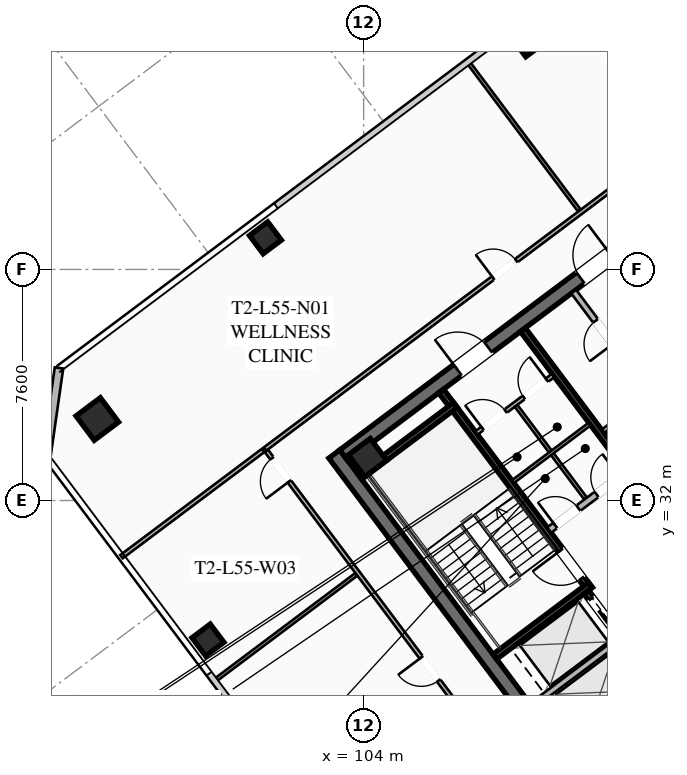
"""IFC4 building model, lengths in metres.
Left out: names, types, materials, properties, quantities, classifications, styles, units other than length and angle.
Written with IfcOpenShell. Run it as: python <this file> out.ifc"""

import sys

from ifc_helpers import new_model, si_unit, direction, frame, frame_2d, origin, origin_2d, place, context, subcontext, project, spatial, rectangle, hollow_rectangle, extrude, element, fill, save


model = new_model("IFC4")
c1 = context("Model", 3, precision=1e-05, world=origin(), true_north=direction((0.0, 1.0)))
c2 = subcontext(c1, "Body", "Model", "MODEL_VIEW")
j1 = project(units=[si_unit("LENGTHUNIT", "METRE"), si_unit("PLANEANGLEUNIT", "RADIAN")], contexts=[c1])
p1 = place(None, origin())
s1 = spatial("IfcSite", under=j1, at=p1, CompositionType="ELEMENT")
p2 = place(p1, origin())
s2 = spatial("IfcBuilding", under=s1, at=p2, CompositionType="ELEMENT")
p3 = place(p2, frame((0.0, 0.0, 204.2)))
s3 = spatial("IfcBuildingStorey", under=s2, at=p3, CompositionType="ELEMENT", Elevation=204.2)
p4 = place(p3, frame((112.396, 21.047, 0.0), z_axis=(0.0, 0.0, 1.0), x_axis=(-0.600005007985, 0.799996243986, 0.0)))
e1 = element("IfcWall", 1, at=p4, inside=s3, PredefinedType="SHEAR", context=c2, shape_type="SweptSolid", body=[
    extrude(rectangle(XDim=15.6, YDim=0.45, at=frame_2d((7.8, 0.0))), origin(), (0.0, 0.0, 1.0), 3.55),
])
p5 = place(p3, frame((103.351, 33.482, 0.0), z_axis=(0.0, 0.0, 1.0), x_axis=(0.8, 0.6, 0.0)))
e2 = element("IfcWall", 2, at=p5, inside=s3, PredefinedType="SHEAR", context=c2, shape_type="SweptSolid", body=[
    extrude(rectangle(XDim=15.26, YDim=0.45, at=frame_2d((7.63, 0.0))), origin(), (0.0, 0.0, 1.0), 3.55),
])
p6 = place(p5, frame((4.68, 0.0, 0.0)))
e3 = element("IfcOpeningElement", 3, at=p6, cuts=e2, PredefinedType="OPENING", context=c2, shape_type="SweptSolid", body=[
    extrude(rectangle(XDim=1.25, YDim=2.25, at=frame_2d((0.625, 1.125))), frame((0.0, 0.235, 0.0), z_axis=(0.0, -1.0, 0.0), x_axis=(1.0, 0.0, 0.0)), (0.0, 0.0, 1.0), 0.47),
])
p7 = place(p5, frame((9.73, 0.0, 0.0)))
e4 = element("IfcOpeningElement", 4, at=p7, cuts=e2, PredefinedType="OPENING", context=c2, shape_type="SweptSolid", body=[
    extrude(rectangle(XDim=1.25, YDim=2.25, at=frame_2d((0.625, 1.125))), frame((0.0, 0.235, 0.0), z_axis=(0.0, -1.0, 0.0), x_axis=(1.0, 0.0, 0.0)), (0.0, 0.0, 1.0), 0.47),
])
p8 = place(p3, frame((104.13, 33.41, 0.0), z_axis=(0.0, 0.0, 1.0), x_axis=(0.799999996291, 0.600000004945, 0.0)))
e5 = element("IfcColumn", 5, at=p8, inside=s3, PredefinedType="COLUMN", context=c2, shape_type="SweptSolid", body=[
    extrude(hollow_rectangle(XDim=0.9, YDim=0.9, WallThickness=0.04, at=origin_2d()), origin(), (0.0, 0.0, 1.0), 3.37),
])
p9 = place(p3, frame((95.24, 34.68, 0.0), z_axis=(0.0, 0.0, 1.0), x_axis=(0.799999996291, 0.600000004945, 0.0)))
e6 = element("IfcColumn", 6, at=p9, inside=s3, PredefinedType="COLUMN", context=c2, shape_type="SweptSolid", body=[
    extrude(hollow_rectangle(XDim=1.0, YDim=1.0, WallThickness=0.04, at=origin_2d()), origin(), (0.0, 0.0, 1.0), 3.37),
])
for number, where, z_axis, x_axis in (
    (7, (109.41, 47.12, 0.0), (0.0, 0.0, 1.0), (0.8, 0.6, 0.0)),
    (8, (100.77, 40.64, 0.0), (0.0, 0.0, 1.0), (0.8, 0.6, 0.0)),
    (9, (98.88, 27.41, 0.0), (0.0, 0.0, 1.0), (0.8, 0.6, 0.0)),
):
    element("IfcColumn", number, at=place(p3, frame(where, z_axis=z_axis, x_axis=x_axis)), inside=s3, PredefinedType="COLUMN", context=c2, shape_type="SweptSolid", body=[
        extrude(hollow_rectangle(XDim=0.75, YDim=0.75, WallThickness=0.032, at=origin_2d()), origin(), (0.0, 0.0, 1.0), 3.37),
    ])
p10 = place(p3, frame((93.56, 33.42, 0.0), z_axis=(0.0, 0.0, 1.0), x_axis=(0.14138683146, 0.989954425158, 0.0)))
e10 = element("IfcWall", 10, at=p10, inside=s3, PredefinedType="SOLIDWALL", context=c2, shape_type="SweptSolid", body=[
    extrude(rectangle(XDim=2.97, YDim=0.28, at=frame_2d((1.485, 0.0))), origin(), (0.0, 0.0, 1.0), 3.37),
])
p11 = place(p3, frame((111.44, 29.08, 0.0), z_axis=(0.0, 0.0, 1.0), x_axis=(-0.59999041401, 0.800007189403, 0.0)))
e11 = element("IfcWall", 11, at=p11, inside=s3, PredefinedType="SHEAR", context=c2, shape_type="SweptSolid", body=[
    extrude(rectangle(XDim=8.15, YDim=0.2, at=frame_2d((4.075, 0.0))), origin(), (0.0, 0.0, 1.0), 3.37),
])
p12 = place(p11, frame((0.45, 0.0, 0.0)))
e12 = element("IfcOpeningElement", 12, at=p12, cuts=e11, PredefinedType="OPENING", context=c2, shape_type="SweptSolid", body=[
    extrude(rectangle(XDim=1.15, YDim=2.2, at=frame_2d((0.575, 1.1))), frame((0.0, 0.11, 0.0), z_axis=(0.0, -1.0, 0.0), x_axis=(1.0, 0.0, 0.0)), (0.0, 0.0, 1.0), 0.22),
])
for number, where, z_axis, x_axis in (
    (13, (108.316, 26.862, 0.0), (0.0, 0.0, 1.0), (0.8, 0.6, 0.0)),
    (14, (103.876, 32.782, 0.0), (0.0, 0.0, 1.0), (0.8, 0.6, 0.0)),
):
    element("IfcWall", number, at=place(p3, frame(where, z_axis=z_axis, x_axis=x_axis)), inside=s3, PredefinedType="SHEAR", context=c2, shape_type="SweptSolid", body=[
        extrude(rectangle(XDim=3.93, YDim=0.2, at=frame_2d((1.965, 0.0))), origin(), (0.0, 0.0, 1.0), 3.37),
    ])
p13 = place(p3, frame((118.058, 25.856, 0.0), z_axis=(0.0, 0.0, 1.0), x_axis=(-0.600002657301, 0.799998007018, 0.0)))
e15 = element("IfcWall", 15, at=p13, inside=s3, PredefinedType="SHEAR", context=c2, shape_type="SweptSolid", body=[
    extrude(rectangle(XDim=14.7, YDim=0.2, at=frame_2d((7.35, 0.0))), origin(), (0.0, 0.0, 1.0), 3.37),
])
p14 = place(p3, frame((110.104, 31.028, 0.0), z_axis=(0.0, 0.0, 1.0), x_axis=(0.800018601094, 0.59997519774, 0.0)))
e16 = element("IfcWall", 16, at=p14, inside=s3, PredefinedType="SOLIDWALL", context=c2, shape_type="SweptSolid", body=[
    extrude(rectangle(XDim=3.15, YDim=0.22, at=frame_2d((1.575, 0.0))), origin(), (0.0, 0.0, 1.0), 2.723),
])
p15 = place(p14, frame((0.25, 0.0, 0.0)))
e17 = element("IfcOpeningElement", 17, at=p15, cuts=e16, PredefinedType="OPENING", context=c2, shape_type="SweptSolid", body=[
    extrude(rectangle(XDim=0.95, YDim=2.05, at=frame_2d((0.475, 1.025))), frame((0.0, 0.12, 0.0), z_axis=(0.0, -1.0, 0.0), x_axis=(1.0, 0.0, 0.0)), (0.0, 0.0, 1.0), 0.24),
])
p16 = place(p14, frame((1.95, 0.0, 0.0)))
e18 = element("IfcOpeningElement", 18, at=p16, cuts=e16, PredefinedType="OPENING", context=c2, shape_type="SweptSolid", body=[
    extrude(rectangle(XDim=0.95, YDim=2.05, at=frame_2d((0.475, 1.025))), frame((0.0, 0.12, 0.0), z_axis=(0.0, -1.0, 0.0), x_axis=(1.0, 0.0, 0.0)), (0.0, 0.0, 1.0), 0.24),
])
p17 = place(p3, frame((115.25, 23.75, 0.0), z_axis=(0.0, 0.0, 1.0), x_axis=(-0.599994036198, 0.800004472816, 0.0)))
e19 = element("IfcWall", 19, at=p17, inside=s3, PredefinedType="SHEAR", context=c2, shape_type="SweptSolid", body=[
    extrude(rectangle(XDim=6.55, YDim=0.2, at=frame_2d((3.275, 0.0))), origin(), (0.0, 0.0, 1.0), 3.37),
])
p18 = place(p17, frame((4.975, 0.0, 0.0)))
e20 = element("IfcOpeningElement", 20, at=p18, cuts=e19, PredefinedType="OPENING", context=c2, shape_type="SweptSolid", body=[
    extrude(rectangle(XDim=1.3, YDim=2.25, at=frame_2d((0.65, 1.125))), frame((0.0, 0.11, 0.0), z_axis=(0.0, -1.0, 0.0), x_axis=(1.0, 0.0, 0.0)), (0.0, 0.0, 1.0), 0.22),
])
p19 = place(p17, frame((2.975, 0.0, 0.0)))
e21 = element("IfcOpeningElement", 21, at=p19, cuts=e19, PredefinedType="OPENING", context=c2, shape_type="SweptSolid", body=[
    extrude(rectangle(XDim=1.3, YDim=2.25, at=frame_2d((0.65, 1.125))), frame((0.0, 0.11, 0.0), z_axis=(0.0, -1.0, 0.0), x_axis=(1.0, 0.0, 0.0)), (0.0, 0.0, 1.0), 0.22),
])
p20 = place(p17, frame((0.775, 0.0, 0.0)))
e22 = element("IfcOpeningElement", 22, at=p20, cuts=e19, PredefinedType="OPENING", context=c2, shape_type="SweptSolid", body=[
    extrude(rectangle(XDim=1.3, YDim=2.25, at=frame_2d((0.65, 1.125))), frame((0.0, 0.11, 0.0), z_axis=(0.0, -1.0, 0.0), x_axis=(1.0, 0.0, 0.0)), (0.0, 0.0, 1.0), 0.22),
])
for number, where, z_axis, x_axis in (
    (23, (110.746, 23.622, 0.0), (0.0, 0.0, 1.0), (0.8, 0.6, 0.0)),
    (24, (109.528, 25.246, 0.0), (0.0, 0.0, 1.0), (0.8, 0.6, 0.0)),
):
    element("IfcWall", number, at=place(p3, frame(where, z_axis=z_axis, x_axis=x_axis)), inside=s3, PredefinedType="SOLIDWALL", context=c2, shape_type="SweptSolid", body=[
        extrude(rectangle(XDim=3.58, YDim=0.2, at=frame_2d((1.79, 0.0))), origin(), (0.0, 0.0, 1.0), 3.37),
    ])
p21 = place(p3, frame((107.71, 34.22, 0.0), z_axis=(0.0, 0.0, 1.0), x_axis=(0.799981399002, 0.60002480053, 0.0)))
e25 = element("IfcWall", 25, at=p21, inside=s3, PredefinedType="PARTITIONING", context=c2, shape_type="SweptSolid", body=[
    extrude(rectangle(XDim=3.15, YDim=0.135, at=frame_2d((1.575, 0.0))), origin(), (0.0, 0.0, 1.0), 2.723),
])
p22 = place(p21, frame((0.25, 0.0, 0.0)))
e26 = element("IfcOpeningElement", 26, at=p22, cuts=e25, PredefinedType="OPENING", context=c2, shape_type="SweptSolid", body=[
    extrude(rectangle(XDim=0.95, YDim=2.05, at=frame_2d((0.475, 1.025))), frame((0.0, 0.077, 0.0), z_axis=(0.0, -1.0, 0.0), x_axis=(1.0, 0.0, 0.0)), (0.0, 0.0, 1.0), 0.155),
])
p23 = place(p21, frame((1.95, 0.0, 0.0)))
e27 = element("IfcOpeningElement", 27, at=p23, cuts=e25, PredefinedType="OPENING", context=c2, shape_type="SweptSolid", body=[
    extrude(rectangle(XDim=0.95, YDim=2.05, at=frame_2d((0.475, 1.025))), frame((0.0, 0.077, 0.0), z_axis=(0.0, -1.0, 0.0), x_axis=(1.0, 0.0, 0.0)), (0.0, 0.0, 1.0), 0.155),
])
p24 = place(p3, frame((111.296, 32.072, 0.0), z_axis=(0.0, 0.0, 1.0), x_axis=(-0.59995887973, 0.800030838552, 0.0)))
e28 = element("IfcWall", 28, at=p24, inside=s3, PredefinedType="PARTITIONING", context=c2, shape_type="SweptSolid", body=[
    extrude(rectangle(XDim=3.8, YDim=0.11, at=frame_2d((1.9, 0.0))), origin(), (0.0, 0.0, 1.0), 2.723),
])
p25 = place(p3, frame((108.91, 32.62, 0.0), z_axis=(0.0, 0.0, 1.0), x_axis=(0.800018601094, 0.59997519774, 0.0)))
e29 = element("IfcWall", 29, at=p25, inside=s3, PredefinedType="PARTITIONING", context=c2, shape_type="SweptSolid", body=[
    extrude(rectangle(XDim=3.15, YDim=0.11, at=frame_2d((1.575, 0.0))), origin(), (0.0, 0.0, 1.0), 2.723),
])
p26 = place(p3, frame((115.11, 33.27, 0.0), z_axis=(0.0, 0.0, 1.0), x_axis=(-0.600011160345, 0.79999162962, 0.0)))
e30 = element("IfcWall", 30, at=p26, inside=s3, PredefinedType="SOLIDWALL", context=c2, shape_type="SweptSolid", body=[
    extrude(rectangle(XDim=7.0, YDim=0.2, at=frame_2d((3.5, 0.0))), origin(), (0.0, 0.0, 1.0), 2.723),
])
p27 = place(p26, frame((0.85, 0.0, 0.0)))
e31 = element("IfcOpeningElement", 31, at=p27, cuts=e30, PredefinedType="OPENING", context=c2, shape_type="SweptSolid", body=[
    extrude(rectangle(XDim=0.95, YDim=2.05, at=frame_2d((0.475, 1.025))), frame((0.0, 0.11, 0.0), z_axis=(0.0, -1.0, 0.0), x_axis=(1.0, 0.0, 0.0)), (0.0, 0.0, 1.0), 0.22),
])
p28 = place(p26, frame((4.85, 0.0, 0.0)))
e32 = element("IfcOpeningElement", 32, at=p28, cuts=e30, PredefinedType="OPENING", context=c2, shape_type="SweptSolid", body=[
    extrude(rectangle(XDim=0.95, YDim=2.05, at=frame_2d((0.475, 1.025))), frame((0.0, 0.11, 0.0), z_axis=(0.0, -1.0, 0.0), x_axis=(1.0, 0.0, 0.0)), (0.0, 0.0, 1.0), 0.22),
])
p29 = place(p3, frame((111.876, 34.282, 0.0), z_axis=(0.0, 0.0, 1.0), x_axis=(0.8, 0.6, 0.0)))
e33 = element("IfcWall", 33, at=p29, inside=s3, PredefinedType="PARTITIONING", context=c2, shape_type="SweptSolid", body=[
    extrude(rectangle(XDim=1.88, YDim=0.135, at=frame_2d((0.94, 0.0))), origin(), (0.0, 0.0, 1.0), 2.723),
])
p30 = place(p3, frame((100.756, 33.692, 0.0), z_axis=(0.0, 0.0, 1.0), x_axis=(0.799998716732, 0.60000171102, 0.0)))
e34 = element("IfcWall", 34, at=p30, inside=s3, PredefinedType="PARTITIONING", context=c2, shape_type="SweptSolid", body=[
    extrude(rectangle(XDim=22.83, YDim=0.135, at=frame_2d((11.415, 0.0))), origin(), (0.0, 0.0, 1.0), 2.723),
])
p31 = place(p30, frame((9.38, 0.0, 0.0)))
e35 = element("IfcOpeningElement", 35, at=p31, cuts=e34, PredefinedType="OPENING", context=c2, shape_type="SweptSolid", body=[
    extrude(rectangle(XDim=0.95, YDim=2.05, at=frame_2d((0.475, 1.025))), frame((0.0, 0.077, 0.0), z_axis=(0.0, -1.0, 0.0), x_axis=(1.0, 0.0, 0.0)), (0.0, 0.0, 1.0), 0.155),
])
p32 = place(p30, frame((21.58, 0.0, 0.0)))
e36 = element("IfcOpeningElement", 36, at=p32, cuts=e34, PredefinedType="OPENING", context=c2, shape_type="SweptSolid", body=[
    extrude(rectangle(XDim=0.95, YDim=2.05, at=frame_2d((0.475, 1.025))), frame((0.0, 0.077, 0.0), z_axis=(0.0, -1.0, 0.0), x_axis=(1.0, 0.0, 0.0)), (0.0, 0.0, 1.0), 0.155),
])
p33 = place(p3, frame((111.092, 41.544, 0.0), z_axis=(0.0, 0.0, 1.0), x_axis=(-0.600006403464, 0.799995197362, 0.0)))
e37 = element("IfcWall", 37, at=p33, inside=s3, PredefinedType="PARTITIONING", context=c2, shape_type="SweptSolid", body=[
    extrude(rectangle(XDim=6.1, YDim=0.11, at=frame_2d((3.05, 0.0))), origin(), (0.0, 0.0, 1.0), 2.723),
])
p34 = place(p3, frame((113.23, 17.06, 0.0), z_axis=(0.0, 0.0, 1.0), x_axis=(-0.600003772342, 0.79999717073, 0.0)))
e38 = element("IfcWall", 38, at=p34, inside=s3, PredefinedType="PARTITIONING", context=c2, shape_type="SweptSolid", body=[
    extrude(rectangle(XDim=20.71, YDim=0.135, at=frame_2d((10.355, 0.0))), origin(), (0.0, 0.0, 1.0), 2.723),
])
p35 = place(p34, frame((0.3, 0.0, 0.0)))
e39 = element("IfcOpeningElement", 39, at=p35, cuts=e38, PredefinedType="OPENING", context=c2, shape_type="SweptSolid", body=[
    extrude(rectangle(XDim=0.95, YDim=2.05, at=frame_2d((0.475, 1.025))), frame((0.0, 0.077, 0.0), z_axis=(0.0, -1.0, 0.0), x_axis=(1.0, 0.0, 0.0)), (0.0, 0.0, 1.0), 0.155),
])
p36 = place(p34, frame((11.272, 0.0, 0.0)))
e40 = element("IfcOpeningElement", 40, at=p36, cuts=e38, PredefinedType="OPENING", context=c2, shape_type="SweptSolid", body=[
    extrude(rectangle(XDim=0.95, YDim=2.05, at=frame_2d((0.475, 1.025))), frame((0.0, 0.077, 0.0), z_axis=(0.0, -1.0, 0.0), x_axis=(1.0, 0.0, 0.0)), (0.0, 0.0, 1.0), 0.155),
])
p37 = place(p34, frame((19.46, 0.0, 0.0)))
e41 = element("IfcOpeningElement", 41, at=p37, cuts=e38, PredefinedType="OPENING", context=c2, shape_type="SweptSolid", body=[
    extrude(rectangle(XDim=0.95, YDim=2.05, at=frame_2d((0.475, 1.025))), frame((0.0, 0.077, 0.0), z_axis=(0.0, -1.0, 0.0), x_axis=(1.0, 0.0, 0.0)), (0.0, 0.0, 1.0), 0.155),
])
p38 = place(p3, frame((100.692, 33.644, 0.0), z_axis=(0.0, 0.0, 1.0), x_axis=(-0.800005033825, -0.599993288175, 0.0)))
e42 = element("IfcWall", 42, at=p38, inside=s3, PredefinedType="PARTITIONING", context=c2, shape_type="SweptSolid", body=[
    extrude(rectangle(XDim=5.82, YDim=0.135, at=frame_2d((2.91, 0.0))), origin(), (0.0, 0.0, 1.0), 2.723),
])
p39 = place(p3, frame((99.096, 26.072, 0.0), z_axis=(0.0, 0.0, 1.0), x_axis=(0.800005033825, 0.599993288175, 0.0)))
e43 = element("IfcWall", 43, at=p39, inside=s3, PredefinedType="PARTITIONING", context=c2, shape_type="SweptSolid", body=[
    extrude(rectangle(XDim=5.82, YDim=0.11, at=frame_2d((2.91, 0.0))), origin(), (0.0, 0.0, 1.0), 2.723),
])
p40 = place(p6, origin())
e44 = element("IfcDoor", 44, at=p40, inside=s3, OperationType="SINGLE_SWING_LEFT", PredefinedType="DOOR", context=c2, shape_type="SweptSolid", body=[
    extrude(rectangle(XDim=1.25, YDim=2.25, at=frame_2d((0.625, 1.125))), frame((0.0, 0.025, 0.0), z_axis=(0.0, -1.0, 0.0), x_axis=(1.0, 0.0, 0.0)), (0.0, 0.0, 1.0), 0.05),
])
fill(e3, e44)
p41 = place(p7, origin())
e45 = element("IfcDoor", 45, at=p41, inside=s3, OperationType="SINGLE_SWING_RIGHT", PredefinedType="DOOR", context=c2, shape_type="SweptSolid", body=[
    extrude(rectangle(XDim=1.25, YDim=2.25, at=frame_2d((0.625, 1.125))), frame((0.0, 0.025, 0.0), z_axis=(0.0, -1.0, 0.0), x_axis=(1.0, 0.0, 0.0)), (0.0, 0.0, 1.0), 0.05),
])
fill(e4, e45)
p42 = place(p12, origin())
e46 = element("IfcDoor", 46, at=p42, inside=s3, OperationType="SINGLE_SWING_RIGHT", PredefinedType="DOOR", context=c2, shape_type="SweptSolid", body=[
    extrude(rectangle(XDim=1.15, YDim=2.2, at=frame_2d((0.575, 1.1))), frame((0.0, 0.025, 0.0), z_axis=(0.0, -1.0, 0.0), x_axis=(1.0, 0.0, 0.0)), (0.0, 0.0, 1.0), 0.05),
])
fill(e12, e46)
p43 = place(p22, origin())
e47 = element("IfcDoor", 47, at=p43, inside=s3, OperationType="SINGLE_SWING_LEFT", PredefinedType="DOOR", context=c2, shape_type="SweptSolid", body=[
    extrude(rectangle(XDim=0.95, YDim=2.05, at=frame_2d((0.475, 1.025))), frame((0.0, 0.025, 0.0), z_axis=(0.0, -1.0, 0.0), x_axis=(1.0, 0.0, 0.0)), (0.0, 0.0, 1.0), 0.05),
])
fill(e26, e47)
p44 = place(p23, origin())
e48 = element("IfcDoor", 48, at=p44, inside=s3, OperationType="SINGLE_SWING_RIGHT", PredefinedType="DOOR", context=c2, shape_type="SweptSolid", body=[
    extrude(rectangle(XDim=0.95, YDim=2.05, at=frame_2d((0.475, 1.025))), frame((0.0, 0.025, 0.0), z_axis=(0.0, -1.0, 0.0), x_axis=(1.0, 0.0, 0.0)), (0.0, 0.0, 1.0), 0.05),
])
fill(e27, e48)
p45 = place(p15, origin())
e49 = element("IfcDoor", 49, at=p45, inside=s3, OperationType="SINGLE_SWING_LEFT", PredefinedType="DOOR", context=c2, shape_type="SweptSolid", body=[
    extrude(rectangle(XDim=0.95, YDim=2.05, at=frame_2d((0.475, 1.025))), frame((0.0, 0.025, 0.0), z_axis=(0.0, -1.0, 0.0), x_axis=(1.0, 0.0, 0.0)), (0.0, 0.0, 1.0), 0.05),
])
fill(e17, e49)
p46 = place(p16, origin())
e50 = element("IfcDoor", 50, at=p46, inside=s3, OperationType="SINGLE_SWING_RIGHT", PredefinedType="DOOR", context=c2, shape_type="SweptSolid", body=[
    extrude(rectangle(XDim=0.95, YDim=2.05, at=frame_2d((0.475, 1.025))), frame((0.0, 0.025, 0.0), z_axis=(0.0, -1.0, 0.0), x_axis=(1.0, 0.0, 0.0)), (0.0, 0.0, 1.0), 0.05),
])
fill(e18, e50)
p47 = place(p28, origin())
e51 = element("IfcDoor", 51, at=p47, inside=s3, OperationType="SINGLE_SWING_LEFT", PredefinedType="DOOR", context=c2, shape_type="SweptSolid", body=[
    extrude(rectangle(XDim=0.95, YDim=2.05, at=frame_2d((0.475, 1.025))), frame((0.0, 0.025, 0.0), z_axis=(0.0, -1.0, 0.0), x_axis=(1.0, 0.0, 0.0)), (0.0, 0.0, 1.0), 0.05),
])
fill(e32, e51)
p48 = place(p31, origin())
e52 = element("IfcDoor", 52, at=p48, inside=s3, OperationType="SINGLE_SWING_LEFT", PredefinedType="DOOR", context=c2, shape_type="SweptSolid", body=[
    extrude(rectangle(XDim=0.95, YDim=2.05, at=frame_2d((0.475, 1.025))), frame((0.0, 0.025, 0.0), z_axis=(0.0, -1.0, 0.0), x_axis=(1.0, 0.0, 0.0)), (0.0, 0.0, 1.0), 0.05),
])
fill(e35, e52)
p49 = place(p36, origin())
e53 = element("IfcDoor", 53, at=p49, inside=s3, OperationType="SINGLE_SWING_RIGHT", PredefinedType="DOOR", context=c2, shape_type="SweptSolid", body=[
    extrude(rectangle(XDim=0.95, YDim=2.05, at=frame_2d((0.475, 1.025))), frame((0.0, 0.025, 0.0), z_axis=(0.0, -1.0, 0.0), x_axis=(1.0, 0.0, 0.0)), (0.0, 0.0, 1.0), 0.05),
])
fill(e40, e53)
p50 = place(p37, origin())
e54 = element("IfcDoor", 54, at=p50, inside=s3, OperationType="SINGLE_SWING_LEFT", PredefinedType="DOOR", context=c2, shape_type="SweptSolid", body=[
    extrude(rectangle(XDim=0.95, YDim=2.05, at=frame_2d((0.475, 1.025))), frame((0.0, 0.025, 0.0), z_axis=(0.0, -1.0, 0.0), x_axis=(1.0, 0.0, 0.0)), (0.0, 0.0, 1.0), 0.05),
])
fill(e41, e54)
p51 = place(p18, origin())
e55 = element("IfcDoor", 55, at=p51, inside=s3, OperationType="SLIDING_TO_LEFT", PredefinedType="DOOR", context=c2, shape_type="SweptSolid", body=[
    extrude(rectangle(XDim=1.3, YDim=2.25, at=frame_2d((0.65, 1.125))), frame((0.0, 0.025, 0.0), z_axis=(0.0, -1.0, 0.0), x_axis=(1.0, 0.0, 0.0)), (0.0, 0.0, 1.0), 0.05),
])
fill(e20, e55)
save(model, sys.argv[1])
